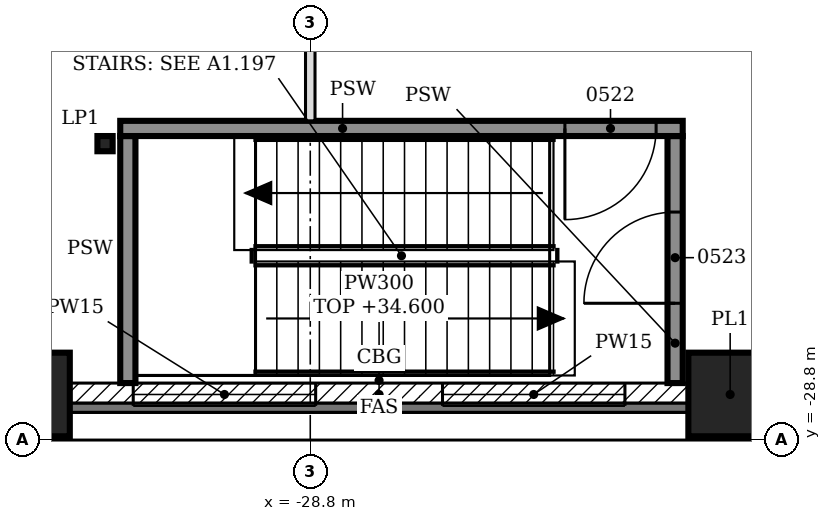
"""IFC4 building model, lengths in metres.
Left out: names, types, materials, properties, quantities, classifications, styles, units other than length and angle.
Written with IfcOpenShell. Run it as: python <this file> out.ifc"""

import sys

from ifc_helpers import new_model, si_unit, direction, frame, frame_2d, origin, origin_2d, place, context, subcontext, project, spatial, polyline, rectangle, hollow_rectangle, i_section, outline, extrude, element, fill, save


model = new_model("IFC4")
c1 = context("Model", 3, precision=1e-05, world=origin(), true_north=direction((0.0, 1.0)))
c2 = subcontext(c1, "Body", "Model", "MODEL_VIEW")
j1 = project(units=[si_unit("LENGTHUNIT", "METRE"), si_unit("PLANEANGLEUNIT", "RADIAN")], contexts=[c1])
p1 = place(None, origin())
s1 = spatial("IfcSite", under=j1, at=p1, CompositionType="ELEMENT")
p2 = place(p1, origin())
s2 = spatial("IfcBuilding", under=s1, at=p2, CompositionType="ELEMENT")
p3 = place(p2, frame((0.0, 0.0, 30.6)))
s3 = spatial("IfcBuildingStorey", under=s2, at=p3, CompositionType="ELEMENT", Elevation=30.6)
for number, where, z_axis, x_axis in (
    (1, (-32.514, -28.2, 0.0), (0.0, 0.0, 1.0), (1.0, 0.0, 0.0)),
    (2, (-23.276, -28.2, 0.0), (0.0, 0.0, 1.0), (1.0, 0.0, 0.0)),
):
    element("IfcColumn", number, at=place(p3, frame(where, z_axis=z_axis, x_axis=x_axis)), inside=s3, PredefinedType="COLUMN", context=c2, shape_type="SweptSolid", body=[
        extrude(hollow_rectangle(XDim=1.1, YDim=1.1, WallThickness=0.06, at=origin_2d()), origin(), (0.0, 0.0, 1.0), 4.8),
    ])
p4 = place(p3, frame((-31.5, -24.9, 0.0), z_axis=(0.0, 0.0, 1.0), x_axis=(1.0, 0.0, 0.0)))
e3 = element("IfcColumn", 3, at=p4, inside=s3, PredefinedType="COLUMN", context=c2, shape_type="SweptSolid", body=[
    extrude(i_section(OverallWidth=0.2, OverallDepth=0.2, WebThickness=0.009, FlangeThickness=0.015, FilletRadius=0.018, at=origin_2d()), origin(), (0.0, 0.0, 1.0), 2.2),
])
p5 = place(p3, frame((-31.964, -28.2, 0.0), z_axis=(0.0, 0.0, 1.0), x_axis=(1.0, 0.0, 0.0)))
e4 = element("IfcWall", 4, at=p5, inside=s3, PredefinedType="SOLIDWALL", context=c2, shape_type="SweptSolid", body=[
    extrude(rectangle(XDim=8.138, YDim=0.3, at=frame_2d((4.069, 0.0))), origin(), (0.0, 0.0, 1.0), 4.0),
])
p6 = place(p5, frame((0.834, 0.0, 0.9)))
e5 = element("IfcOpeningElement", 5, at=p6, cuts=e4, PredefinedType="OPENING", context=c2, shape_type="SweptSolid", body=[
    extrude(rectangle(XDim=2.4, YDim=1.5, at=frame_2d((1.2, 0.75))), frame((0.0, 0.16, 0.0), z_axis=(0.0, -1.0, 0.0), x_axis=(1.0, 0.0, 0.0)), (0.0, 0.0, 1.0), 0.32),
])
p7 = place(p5, frame((4.903, 0.0, 0.9)))
e6 = element("IfcOpeningElement", 6, at=p7, cuts=e4, PredefinedType="OPENING", context=c2, shape_type="SweptSolid", body=[
    extrude(rectangle(XDim=2.4, YDim=1.5, at=frame_2d((1.2, 0.75))), frame((0.0, 0.16, 0.0), z_axis=(0.0, -1.0, 0.0), x_axis=(1.0, 0.0, 0.0)), (0.0, 0.0, 1.0), 0.32),
])
p8 = place(p3, frame((-31.2, -28.05, 0.0), z_axis=(0.0, 0.0, 1.0), x_axis=(0.0, 1.0, 0.0)))
e7 = element("IfcWall", 7, at=p8, inside=s3, PredefinedType="SOLIDWALL", context=c2, shape_type="SweptSolid", body=[
    extrude(rectangle(XDim=3.25, YDim=0.2, at=frame_2d((1.625, 0.0))), origin(), (0.0, 0.0, 1.0), 4.6),
])
p9 = place(p3, frame((-24.0, -28.05, 0.0), z_axis=(0.0, 0.0, 1.0), x_axis=(0.0, 1.0, 0.0)))
e8 = element("IfcWall", 8, at=p9, inside=s3, PredefinedType="SOLIDWALL", context=c2, shape_type="SweptSolid", body=[
    extrude(rectangle(XDim=3.25, YDim=0.2, at=frame_2d((1.625, 0.0))), origin(), (0.0, 0.0, 1.0), 4.6),
])
p10 = place(p9, frame((1.05, 0.0, 0.0)))
e9 = element("IfcOpeningElement", 9, at=p10, cuts=e8, PredefinedType="OPENING", context=c2, shape_type="SweptSolid", body=[
    extrude(rectangle(XDim=1.2, YDim=2.1, at=frame_2d((0.6, 1.05))), frame((0.0, 0.11, 0.0), z_axis=(0.0, -1.0, 0.0), x_axis=(1.0, 0.0, 0.0)), (0.0, 0.0, 1.0), 0.22),
])
p11 = place(p3, frame((-31.3, -24.7, 0.0), z_axis=(0.0, 0.0, 1.0), x_axis=(1.0, 0.0, 0.0)))
e10 = element("IfcWall", 10, at=p11, inside=s3, PredefinedType="SOLIDWALL", context=c2, shape_type="SweptSolid", body=[
    extrude(rectangle(XDim=7.4, YDim=0.2, at=frame_2d((3.7, 0.0))), origin(), (0.0, 0.0, 1.0), 4.6),
])
p12 = place(p11, frame((5.85, 0.0, 0.0)))
e11 = element("IfcOpeningElement", 11, at=p12, cuts=e10, PredefinedType="OPENING", context=c2, shape_type="SweptSolid", body=[
    extrude(rectangle(XDim=1.2, YDim=2.1, at=frame_2d((0.6, 1.05))), frame((0.0, 0.11, 0.0), z_axis=(0.0, -1.0, 0.0), x_axis=(1.0, 0.0, 0.0)), (0.0, 0.0, 1.0), 0.22),
])
p13 = place(p3, frame((-28.8, -24.6, 0.0), z_axis=(0.0, 0.0, 1.0), x_axis=(0.0, 1.0, 0.0)))
e12 = element("IfcWall", 12, at=p13, inside=s3, PredefinedType="PARTITIONING", context=c2, shape_type="SweptSolid", body=[
    extrude(outline(polyline([(0.0, 0.0), (49.2, 0.0), (49.2, 4.6), (43.95, 4.6), (43.948, 3.98), (43.65, 3.98), (43.648, 4.6), (39.15, 4.6), (39.148, 3.98), (38.85, 3.98), (38.848, 4.6), (34.35, 4.6), (34.348, 3.98), (34.05, 3.98), (34.048, 4.6), (29.55, 4.6), (29.548, 3.98), (29.25, 3.98), (29.248, 4.6), (24.75, 4.6), (24.748, 3.98), (24.45, 3.98), (24.448, 4.6), (19.95, 4.6), (19.948, 3.98), (19.65, 3.98), (19.648, 4.6), (15.15, 4.6), (15.148, 3.98), (14.85, 3.98), (14.848, 4.6), (10.35, 4.6), (10.348, 3.98), (10.05, 3.98), (10.048, 4.6), (5.55, 4.6), (5.548, 3.98), (5.25, 3.98), (5.248, 4.6), (0.0, 4.6), (0.0, 0.0)])), frame((0.0, 0.062, 0.0), z_axis=(0.0, -1.0, 0.0), x_axis=(1.0, 0.0, 0.0)), (0.0, 0.0, 1.0), 0.125),
])
p14 = place(p13, frame((1.7, 0.0, 0.0)))
e13 = element("IfcOpeningElement", 13, at=p14, cuts=e12, PredefinedType="OPENING", context=c2, shape_type="SweptSolid", body=[
    extrude(rectangle(XDim=1.8, YDim=2.1, at=frame_2d((0.9, 1.05))), frame((0.0, 0.073, 0.0), z_axis=(0.0, -1.0, 0.0), x_axis=(1.0, 0.0, 0.0)), (0.0, 0.0, 1.0), 0.145),
])
p15 = place(p13, frame((8.05, 0.0, 0.0)))
e14 = element("IfcOpeningElement", 14, at=p15, cuts=e12, PredefinedType="OPENING", context=c2, shape_type="SweptSolid", body=[
    extrude(rectangle(XDim=1.8, YDim=2.1, at=frame_2d((0.9, 1.05))), frame((0.0, 0.073, 0.0), z_axis=(0.0, -1.0, 0.0), x_axis=(1.0, 0.0, 0.0)), (0.0, 0.0, 1.0), 0.145),
])
p16 = place(p13, frame((14.7, 0.0, 0.0)))
e15 = element("IfcOpeningElement", 15, at=p16, cuts=e12, PredefinedType="OPENING", context=c2, shape_type="SweptSolid", body=[
    extrude(rectangle(XDim=1.8, YDim=2.1, at=frame_2d((0.9, 1.05))), frame((0.0, 0.073, 0.0), z_axis=(0.0, -1.0, 0.0), x_axis=(1.0, 0.0, 0.0)), (0.0, 0.0, 1.0), 0.145),
])
p17 = place(p13, frame((21.2, 0.0, 0.0)))
e16 = element("IfcOpeningElement", 16, at=p17, cuts=e12, PredefinedType="OPENING", context=c2, shape_type="SweptSolid", body=[
    extrude(rectangle(XDim=1.8, YDim=2.1, at=frame_2d((0.9, 1.05))), frame((0.0, 0.073, 0.0), z_axis=(0.0, -1.0, 0.0), x_axis=(1.0, 0.0, 0.0)), (0.0, 0.0, 1.0), 0.145),
])
p18 = place(p13, frame((26.2, 0.0, 0.0)))
e17 = element("IfcOpeningElement", 17, at=p18, cuts=e12, PredefinedType="OPENING", context=c2, shape_type="SweptSolid", body=[
    extrude(rectangle(XDim=1.8, YDim=2.1, at=frame_2d((0.9, 1.05))), frame((0.0, 0.073, 0.0), z_axis=(0.0, -1.0, 0.0), x_axis=(1.0, 0.0, 0.0)), (0.0, 0.0, 1.0), 0.145),
])
p19 = place(p13, frame((32.7, 0.0, 0.0)))
e18 = element("IfcOpeningElement", 18, at=p19, cuts=e12, PredefinedType="OPENING", context=c2, shape_type="SweptSolid", body=[
    extrude(rectangle(XDim=1.8, YDim=2.1, at=frame_2d((0.9, 1.05))), frame((0.0, 0.073, 0.0), z_axis=(0.0, -1.0, 0.0), x_axis=(1.0, 0.0, 0.0)), (0.0, 0.0, 1.0), 0.145),
])
p20 = place(p13, frame((39.35, 0.0, 0.0)))
e19 = element("IfcOpeningElement", 19, at=p20, cuts=e12, PredefinedType="OPENING", context=c2, shape_type="SweptSolid", body=[
    extrude(rectangle(XDim=1.8, YDim=2.1, at=frame_2d((0.9, 1.05))), frame((0.0, 0.073, 0.0), z_axis=(0.0, -1.0, 0.0), x_axis=(1.0, 0.0, 0.0)), (0.0, 0.0, 1.0), 0.145),
])
p21 = place(p13, frame((45.7, 0.0, 0.0)))
e20 = element("IfcOpeningElement", 20, at=p21, cuts=e12, PredefinedType="OPENING", context=c2, shape_type="SweptSolid", body=[
    extrude(rectangle(XDim=1.8, YDim=2.1, at=frame_2d((0.9, 1.05))), frame((0.0, 0.073, 0.0), z_axis=(0.0, -1.0, 0.0), x_axis=(1.0, 0.0, 0.0)), (0.0, 0.0, 1.0), 0.145),
])
p22 = place(p6, origin())
e21 = element("IfcWindow", 21, at=p22, inside=s3, PartitioningType="SINGLE_PANEL", PredefinedType="WINDOW", context=c2, shape_type="SweptSolid", body=[
    extrude(rectangle(XDim=2.4, YDim=1.5, at=frame_2d((1.2, 0.75))), frame((0.0, 0.03, 0.0), z_axis=(0.0, -1.0, 0.0), x_axis=(1.0, 0.0, 0.0)), (0.0, 0.0, 1.0), 0.06),
])
fill(e5, e21)
p23 = place(p7, origin())
e22 = element("IfcWindow", 22, at=p23, inside=s3, PartitioningType="SINGLE_PANEL", PredefinedType="WINDOW", context=c2, shape_type="SweptSolid", body=[
    extrude(rectangle(XDim=2.4, YDim=1.5, at=frame_2d((1.2, 0.75))), frame((0.0, 0.03, 0.0), z_axis=(0.0, -1.0, 0.0), x_axis=(1.0, 0.0, 0.0)), (0.0, 0.0, 1.0), 0.06),
])
fill(e6, e22)
p24 = place(p12, frame((1.2, 0.0, 0.0), z_axis=(0.0, 0.0, 1.0), x_axis=(-1.0, 0.0, 0.0)))
e23 = element("IfcDoor", 23, at=p24, inside=s3, OperationType="SINGLE_SWING_RIGHT", PredefinedType="DOOR", context=c2, shape_type="SweptSolid", body=[
    extrude(rectangle(XDim=1.2, YDim=2.1, at=frame_2d((0.6, 1.05))), frame((0.0, 0.025, 0.0), z_axis=(0.0, -1.0, 0.0), x_axis=(1.0, 0.0, 0.0)), (0.0, 0.0, 1.0), 0.05),
])
fill(e11, e23)
p25 = place(p10, origin())
e24 = element("IfcDoor", 24, at=p25, inside=s3, OperationType="SINGLE_SWING_LEFT", PredefinedType="DOOR", context=c2, shape_type="SweptSolid", body=[
    extrude(rectangle(XDim=1.2, YDim=2.1, at=frame_2d((0.6, 1.05))), frame((0.0, 0.025, 0.0), z_axis=(0.0, -1.0, 0.0), x_axis=(1.0, 0.0, 0.0)), (0.0, 0.0, 1.0), 0.05),
])
fill(e9, e24)
save(model, sys.argv[1])
